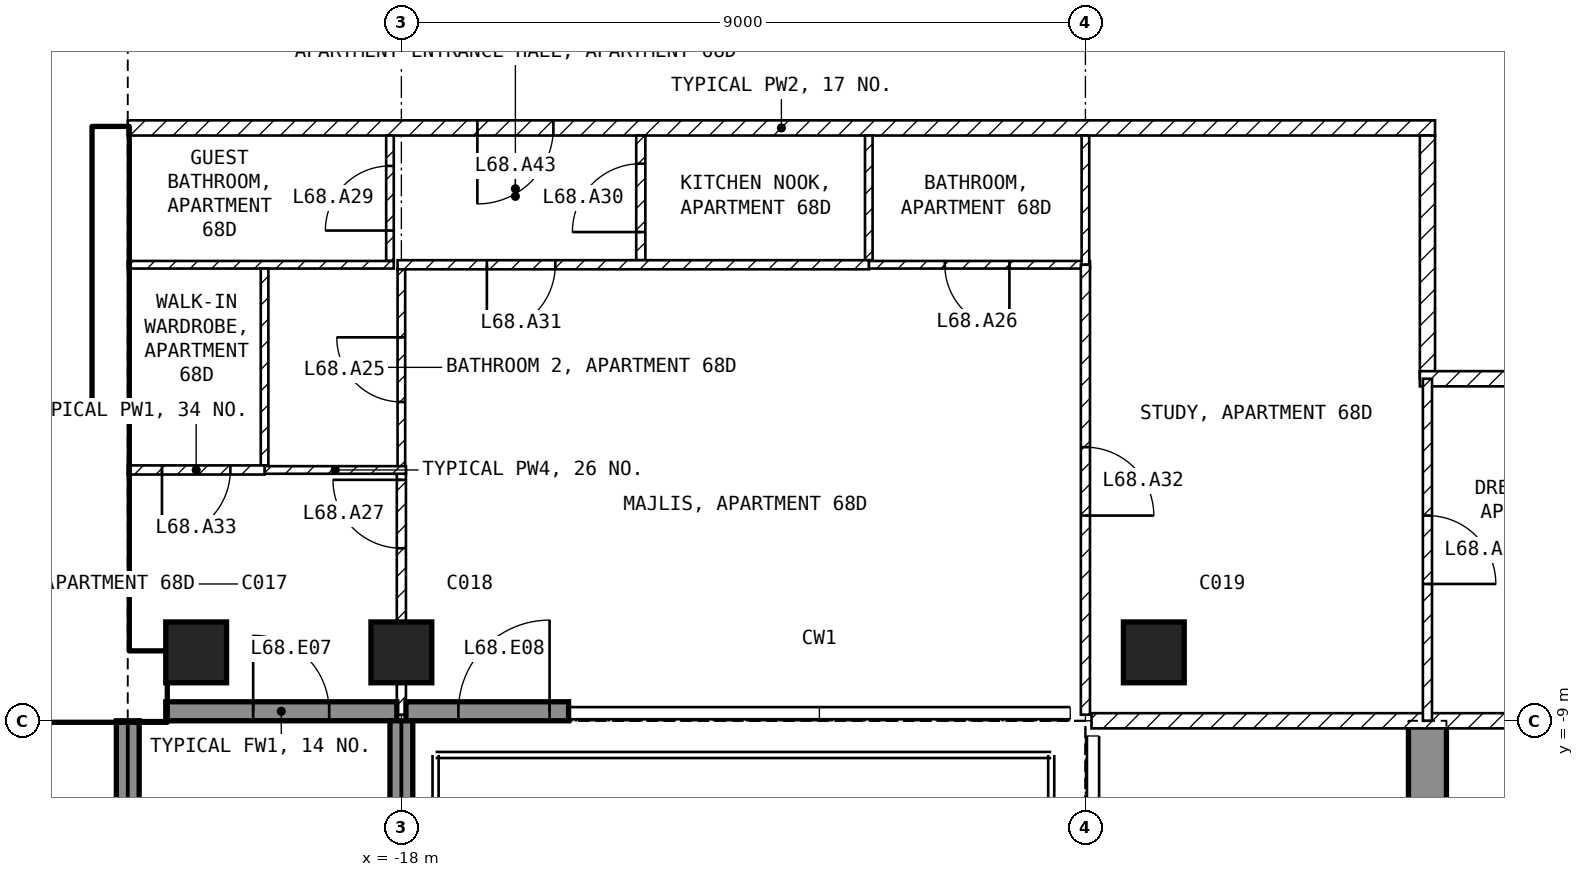
"""IFC4 building model, lengths in metres.
Left out: names, types, materials, properties, quantities, classifications, styles, units other than length and angle.
Written with IfcOpenShell. Run it as: python <this file> out.ifc"""

import sys

from ifc_helpers import new_model, si_unit, direction, frame, frame_2d, origin, origin_2d, place, context, subcontext, project, spatial, polyline, rectangle, outline, extrude, element, fill, save


model = new_model("IFC4")
c1 = context("Model", 3, precision=1e-05, world=origin(), true_north=direction((0.0, 1.0)))
c2 = subcontext(c1, "Body", "Model", "MODEL_VIEW")
j1 = project(units=[si_unit("LENGTHUNIT", "METRE"), si_unit("PLANEANGLEUNIT", "RADIAN")], contexts=[c1])
p1 = place(None, origin())
s1 = spatial("IfcSite", under=j1, at=p1, CompositionType="ELEMENT")
p2 = place(p1, origin())
s2 = spatial("IfcBuilding", under=s1, at=p2, CompositionType="ELEMENT")
p3 = place(p2, frame((0.0, 0.0, 267.5)))
s3 = spatial("IfcBuildingStorey", under=s2, at=p3, CompositionType="ELEMENT", Elevation=267.5)
for number, where, z_axis, x_axis in (
    (1, (-20.7, -8.1, -0.25), (0.0, 0.0, 1.0), (1.0, 0.0, 0.0)),
    (2, (-18.0, -8.1, -0.25), (0.0, 0.0, 1.0), (1.0, 0.0, 0.0)),
    (3, (-8.1, -8.1, -0.25), (0.0, 0.0, 1.0), (1.0, 0.0, 0.0)),
):
    element("IfcColumn", number, at=place(p3, frame(where, z_axis=z_axis, x_axis=x_axis)), inside=s3, PredefinedType="COLUMN", context=c2, shape_type="SweptSolid", body=[
        extrude(rectangle(XDim=0.8, YDim=0.8, at=origin_2d()), origin(), (0.0, 0.0, 1.0), 3.5),
    ])
p4 = place(p3, frame((-4.75, -16.7, -0.25), z_axis=(1.0, 0.0, 0.0), x_axis=(0.0, 1.0, 0.0)))
e4 = element("IfcWall", 4, at=p4, inside=s3, PredefinedType="SHEAR", context=c2, shape_type="SweptSolid", body=[
    extrude(outline(polyline([(0.0, 0.0), (3.2, 0.0), (3.2, 2.65), (5.6, 2.65), (5.6, 0.0), (7.7, 0.0), (7.7, 3.5), (0.0, 3.5), (0.0, 0.0)])), origin(), (0.0, 0.0, 1.0), 0.5),
])
p5 = place(p3, frame((-21.1, -8.875, 0.0), z_axis=(0.0, 0.0, 1.0), x_axis=(1.0, 0.0, 0.0)))
e5 = element("IfcWall", 5, at=p5, inside=s3, PredefinedType="SOLIDWALL", context=c2, shape_type="SweptSolid", body=[
    extrude(rectangle(XDim=3.04, YDim=0.25, at=frame_2d((1.52, 0.0))), origin(), (0.0, 0.0, 1.0), 3.25),
])
p6 = place(p5, frame((1.15, 0.0, 0.0)))
e6 = element("IfcOpeningElement", 6, at=p6, cuts=e5, PredefinedType="OPENING", context=c2, shape_type="SweptSolid", body=[
    extrude(rectangle(XDim=1.0, YDim=2.4, at=frame_2d((0.5, 1.2))), frame((0.0, 0.135, 0.0), z_axis=(0.0, -1.0, 0.0), x_axis=(1.0, 0.0, 0.0)), (0.0, 0.0, 1.0), 0.27),
])
p7 = place(p3, frame((-17.94, -8.875, 0.0), z_axis=(0.0, 0.0, 1.0), x_axis=(1.0, 0.0, 0.0)))
e7 = element("IfcWall", 7, at=p7, inside=s3, PredefinedType="SOLIDWALL", context=c2, shape_type="SweptSolid", body=[
    extrude(rectangle(XDim=2.14, YDim=0.25, at=frame_2d((1.07, 0.0))), origin(), (0.0, 0.0, 1.0), 3.25),
])
p8 = place(p7, frame((0.69, 0.0, 0.0)))
e8 = element("IfcOpeningElement", 8, at=p8, cuts=e7, PredefinedType="OPENING", context=c2, shape_type="SweptSolid", body=[
    extrude(rectangle(XDim=1.2, YDim=2.4, at=frame_2d((0.6, 1.2))), frame((0.0, 0.135, 0.0), z_axis=(0.0, -1.0, 0.0), x_axis=(1.0, 0.0, 0.0)), (0.0, 0.0, 1.0), 0.27),
])
p9 = place(p3, frame((-21.6, -9.0, 0.0), z_axis=(0.0, 0.0, 1.0), x_axis=(0.0, -1.0, 0.0)))
e9 = element("IfcWall", 9, at=p9, inside=s3, PredefinedType="SOLIDWALL", context=c2, shape_type="SweptSolid", body=[
    extrude(rectangle(XDim=2.7, YDim=0.3, at=frame_2d((1.35, 0.0))), origin(), (0.0, 0.0, 1.0), 3.25),
])
p10 = place(p3, frame((-18.0, -9.0, 0.0), z_axis=(0.0, 0.0, 1.0), x_axis=(0.0, -1.0, 0.0)))
e10 = element("IfcWall", 10, at=p10, inside=s3, PredefinedType="SOLIDWALL", context=c2, shape_type="SweptSolid", body=[
    extrude(rectangle(XDim=2.74, YDim=0.3, at=frame_2d((1.37, 0.0))), origin(), (0.0, 0.0, 1.0), 3.25),
])
p11 = place(p3, frame((-30.2, -8.55, 0.0), z_axis=(0.0, 0.0, 1.0), x_axis=(1.0, 0.0, 0.0)))
e11 = element("IfcWall", 11, at=p11, inside=s3, PredefinedType="SHEAR", context=c2, shape_type="SweptSolid", body=[
    extrude(rectangle(XDim=9.1, YDim=0.9, at=frame_2d((4.55, 0.0))), origin(), (0.0, 0.0, 1.0), 3.25),
])
p12 = place(p3, frame((-21.825, -8.1, 0.0), z_axis=(0.0, 0.0, 1.0), x_axis=(0.0, 1.0, 0.0)))
e12 = element("IfcWall", 12, at=p12, inside=s3, PredefinedType="SHEAR", context=c2, shape_type="SweptSolid", body=[
    extrude(rectangle(XDim=6.9, YDim=0.45, at=frame_2d((3.45, 0.0))), origin(), (0.0, 0.0, 1.0), 3.25),
])
p13 = place(p3, frame((-28.35, -5.15, 0.0), z_axis=(0.0, 0.0, 1.0), x_axis=(1.0, 0.0, 0.0)))
e13 = element("IfcWall", 13, at=p13, inside=s3, PredefinedType="SOLIDWALL", context=c2, shape_type="SweptSolid", body=[
    extrude(rectangle(XDim=6.3, YDim=0.2, at=frame_2d((3.15, 0.0))), origin(), (0.0, 0.0, 1.0), 3.25),
])
p14 = place(p13, frame((5.1, 0.0, 0.0)))
e14 = element("IfcOpeningElement", 14, at=p14, cuts=e13, PredefinedType="OPENING", context=c2, shape_type="SweptSolid", body=[
    extrude(rectangle(XDim=1.0, YDim=2.1, at=frame_2d((0.5, 1.05))), frame((0.0, 0.11, 0.0), z_axis=(0.0, -1.0, 0.0), x_axis=(1.0, 0.0, 0.0)), (0.0, 0.0, 1.0), 0.22),
])
p15 = place(p3, frame((-4.4, -1.2, 0.0), z_axis=(0.0, 0.0, 1.0), x_axis=(-1.0, 0.0, 0.0)))
e15 = element("IfcWall", 15, at=p15, inside=s3, PredefinedType="PARTITIONING", context=c2, shape_type="SweptSolid", body=[
    extrude(rectangle(XDim=17.2, YDim=0.2, at=frame_2d((8.6, 0.0))), origin(), (0.0, 0.0, 1.0), 3.25),
])
p16 = place(p15, frame((11.6, 0.0, 0.0)))
e16 = element("IfcOpeningElement", 16, at=p16, cuts=e15, PredefinedType="OPENING", context=c2, shape_type="SweptSolid", body=[
    extrude(rectangle(XDim=1.0, YDim=2.1, at=frame_2d((0.5, 1.05))), frame((0.0, 0.11, 0.0), z_axis=(0.0, -1.0, 0.0), x_axis=(1.0, 0.0, 0.0)), (0.0, 0.0, 1.0), 0.22),
])
p17 = place(p3, frame((-4.5, -4.5, 0.0), z_axis=(0.0, 0.0, 1.0), x_axis=(0.0, 1.0, 0.0)))
e17 = element("IfcWall", 17, at=p17, inside=s3, PredefinedType="PARTITIONING", context=c2, shape_type="SweptSolid", body=[
    extrude(rectangle(XDim=3.2, YDim=0.2, at=frame_2d((1.6, 0.0))), origin(), (0.0, 0.0, 1.0), 3.25),
])
p18 = place(p3, frame((-1.1, -4.5, 0.0), z_axis=(0.0, 0.0, 1.0), x_axis=(-1.0, 0.0, 0.0)))
e18 = element("IfcWall", 18, at=p18, inside=s3, PredefinedType="PARTITIONING", context=c2, shape_type="SweptSolid", body=[
    extrude(rectangle(XDim=3.5, YDim=0.2, at=frame_2d((1.75, 0.0))), origin(), (0.0, 0.0, 1.0), 3.25),
])
p19 = place(p3, frame((8.92, -9.0, 0.0), z_axis=(0.0, 0.0, 1.0), x_axis=(-1.0, 0.0, 0.0)))
e19 = element("IfcWall", 19, at=p19, inside=s3, PredefinedType="PARTITIONING", context=c2, shape_type="SweptSolid", body=[
    extrude(rectangle(XDim=17.84, YDim=0.2, at=frame_2d((8.92, 0.0))), origin(), (0.0, 0.0, 1.0), 3.25),
])
p20 = place(p19, frame((8.42, 0.0, 0.0)))
e20 = element("IfcOpeningElement", 20, at=p20, cuts=e19, PredefinedType="OPENING", context=c2, shape_type="SweptSolid", body=[
    extrude(rectangle(XDim=1.0, YDim=2.1, at=frame_2d((0.5, 1.05))), frame((0.0, 0.11, 0.0), z_axis=(0.0, -1.0, 0.0), x_axis=(1.0, 0.0, 0.0)), (0.0, 0.0, 1.0), 0.22),
])
p21 = place(p3, frame((-11.85, -2.94, 0.0), z_axis=(0.0, 0.0, 1.0), x_axis=(0.0, 1.0, 0.0)))
e21 = element("IfcWall", 21, at=p21, inside=s3, PredefinedType="PARTITIONING", context=c2, shape_type="SweptSolid", body=[
    extrude(rectangle(XDim=1.64, YDim=0.1, at=frame_2d((0.82, 0.0))), origin(), (0.0, 0.0, 1.0), 3.25),
])
p22 = place(p3, frame((-8.94, -3.0, 0.0), z_axis=(0.0, 0.0, 1.0), x_axis=(-1.0, 0.0, 0.0)))
e22 = element("IfcWall", 22, at=p22, inside=s3, PredefinedType="PARTITIONING", context=c2, shape_type="SweptSolid", body=[
    extrude(rectangle(XDim=2.91, YDim=0.1, at=frame_2d((1.455, 0.0))), origin(), (0.0, 0.0, 1.0), 3.25),
])
p23 = place(p22, frame((1.06, 0.0, 0.0)))
e23 = element("IfcOpeningElement", 23, at=p23, cuts=e22, PredefinedType="OPENING", context=c2, shape_type="SweptSolid", body=[
    extrude(rectangle(XDim=0.85, YDim=2.1, at=frame_2d((0.425, 1.05))), frame((0.0, 0.06, 0.0), z_axis=(0.0, -1.0, 0.0), x_axis=(1.0, 0.0, 0.0)), (0.0, 0.0, 1.0), 0.12),
])
p24 = place(p3, frame((-9.0, -1.3, 0.0), z_axis=(0.0, 0.0, 1.0), x_axis=(0.0, -1.0, 0.0)))
e24 = element("IfcWall", 24, at=p24, inside=s3, PredefinedType="PARTITIONING", context=c2, shape_type="SweptSolid", body=[
    extrude(rectangle(XDim=1.7, YDim=0.1, at=frame_2d((0.85, 0.0))), origin(), (0.0, 0.0, 1.0), 3.25),
])
p25 = place(p3, frame((-14.85, -2.94, 0.0), z_axis=(0.0, 0.0, 1.0), x_axis=(0.0, 1.0, 0.0)))
e25 = element("IfcWall", 25, at=p25, inside=s3, PredefinedType="PARTITIONING", context=c2, shape_type="SweptSolid", body=[
    extrude(rectangle(XDim=1.64, YDim=0.12, at=frame_2d((0.82, 0.0))), origin(), (0.0, 0.0, 1.0), 3.25),
])
p26 = place(p25, frame((0.37, 0.0, 0.0)))
e26 = element("IfcOpeningElement", 26, at=p26, cuts=e25, PredefinedType="OPENING", context=c2, shape_type="SweptSolid", body=[
    extrude(rectangle(XDim=0.9, YDim=2.1, at=frame_2d((0.45, 1.05))), frame((0.0, 0.07, 0.0), z_axis=(0.0, -1.0, 0.0), x_axis=(1.0, 0.0, 0.0)), (0.0, 0.0, 1.0), 0.14),
])
p27 = place(p3, frame((-11.85, -3.0, 0.0), z_axis=(0.0, 0.0, 1.0), x_axis=(-1.0, 0.0, 0.0)))
e27 = element("IfcWall", 27, at=p27, inside=s3, PredefinedType="PARTITIONING", context=c2, shape_type="SweptSolid", body=[
    extrude(rectangle(XDim=6.2, YDim=0.12, at=frame_2d((3.1, 0.0))), origin(), (0.0, 0.0, 1.0), 3.25),
])
p28 = place(p27, frame((4.125, 0.0, 0.0)))
e28 = element("IfcOpeningElement", 28, at=p28, cuts=e27, PredefinedType="OPENING", context=c2, shape_type="SweptSolid", body=[
    extrude(rectangle(XDim=0.9, YDim=2.1, at=frame_2d((0.45, 1.05))), frame((0.0, 0.07, 0.0), z_axis=(0.0, -1.0, 0.0), x_axis=(1.0, 0.0, 0.0)), (0.0, 0.0, 1.0), 0.14),
])
p29 = place(p3, frame((-18.15, -2.95, 0.0), z_axis=(0.0, 0.0, 1.0), x_axis=(0.0, 1.0, 0.0)))
e29 = element("IfcWall", 29, at=p29, inside=s3, PredefinedType="PARTITIONING", context=c2, shape_type="SweptSolid", body=[
    extrude(rectangle(XDim=1.65, YDim=0.1, at=frame_2d((0.825, 0.0))), origin(), (0.0, 0.0, 1.0), 2.496),
])
p30 = place(p29, frame((0.4, 0.0, 0.0)))
e30 = element("IfcOpeningElement", 30, at=p30, cuts=e29, PredefinedType="OPENING", context=c2, shape_type="SweptSolid", body=[
    extrude(rectangle(XDim=0.85, YDim=2.1, at=frame_2d((0.425, 1.05))), frame((0.0, 0.06, 0.0), z_axis=(0.0, -1.0, 0.0), x_axis=(1.0, 0.0, 0.0)), (0.0, 0.0, 1.0), 0.12),
])
p31 = place(p3, frame((-18.1, -3.0, 0.0), z_axis=(0.0, 0.0, 1.0), x_axis=(-1.0, 0.0, 0.0)))
e31 = element("IfcWall", 31, at=p31, inside=s3, PredefinedType="PARTITIONING", context=c2, shape_type="SweptSolid", body=[
    extrude(rectangle(XDim=3.5, YDim=0.1, at=frame_2d((1.75, 0.0))), origin(), (0.0, 0.0, 1.0), 3.25),
])
p32 = place(p3, frame((-18.0, -5.7, 0.0), z_axis=(0.0, 0.0, 1.0), x_axis=(0.0, 1.0, 0.0)))
e32 = element("IfcWall", 32, at=p32, inside=s3, PredefinedType="PARTITIONING", context=c2, shape_type="SweptSolid", body=[
    extrude(rectangle(XDim=2.64, YDim=0.1, at=frame_2d((1.32, 0.0))), origin(), (0.0, 0.0, 1.0), 2.496),
])
p33 = place(p32, frame((0.895, 0.0, 0.0)))
e33 = element("IfcOpeningElement", 33, at=p33, cuts=e32, PredefinedType="OPENING", context=c2, shape_type="SweptSolid", body=[
    extrude(rectangle(XDim=0.85, YDim=2.1, at=frame_2d((0.425, 1.05))), frame((0.0, 0.06, 0.0), z_axis=(0.0, -1.0, 0.0), x_axis=(1.0, 0.0, 0.0)), (0.0, 0.0, 1.0), 0.12),
])
p34 = place(p3, frame((-18.0, -8.92, 0.0), z_axis=(0.0, 0.0, 1.0), x_axis=(0.0, 1.0, 0.0)))
e34 = element("IfcWall", 34, at=p34, inside=s3, PredefinedType="PARTITIONING", context=c2, shape_type="SweptSolid", body=[
    extrude(rectangle(XDim=3.22, YDim=0.12, at=frame_2d((1.61, 0.0))), origin(), (0.0, 0.0, 1.0), 2.496),
])
p35 = place(p34, frame((2.19, 0.0, 0.0)))
e35 = element("IfcOpeningElement", 35, at=p35, cuts=e34, PredefinedType="OPENING", context=c2, shape_type="SweptSolid", body=[
    extrude(rectangle(XDim=0.9, YDim=2.1, at=frame_2d((0.45, 1.05))), frame((0.0, 0.07, 0.0), z_axis=(0.0, -1.0, 0.0), x_axis=(1.0, 0.0, 0.0)), (0.0, 0.0, 1.0), 0.14),
])
p36 = place(p3, frame((-9.0, -3.0, 0.0), z_axis=(0.0, 0.0, 1.0), x_axis=(0.0, -1.0, 0.0)))
e36 = element("IfcWall", 36, at=p36, inside=s3, PredefinedType="PARTITIONING", context=c2, shape_type="SweptSolid", body=[
    extrude(rectangle(XDim=5.92, YDim=0.12, at=frame_2d((2.96, 0.0))), origin(), (0.0, 0.0, 1.0), 3.25),
])
p37 = place(p36, frame((2.4, 0.0, 0.0)))
e37 = element("IfcOpeningElement", 37, at=p37, cuts=e36, PredefinedType="OPENING", context=c2, shape_type="SweptSolid", body=[
    extrude(rectangle(XDim=0.9, YDim=2.1, at=frame_2d((0.45, 1.05))), frame((0.0, 0.07, 0.0), z_axis=(0.0, -1.0, 0.0), x_axis=(1.0, 0.0, 0.0)), (0.0, 0.0, 1.0), 0.14),
])
p38 = place(p3, frame((-19.8, -5.64, 0.0), z_axis=(0.0, 0.0, 1.0), x_axis=(0.0, 1.0, 0.0)))
e38 = element("IfcWall", 38, at=p38, inside=s3, PredefinedType="PARTITIONING", context=c2, shape_type="SweptSolid", body=[
    extrude(rectangle(XDim=2.59, YDim=0.1, at=frame_2d((1.295, 0.0))), origin(), (0.0, 0.0, 1.0), 3.25),
])
p39 = place(p3, frame((-17.94, -5.7, 0.0), z_axis=(0.0, 0.0, 1.0), x_axis=(-1.0, 0.0, 0.0)))
e39 = element("IfcWall", 39, at=p39, inside=s3, PredefinedType="PARTITIONING", context=c2, shape_type="SweptSolid", body=[
    extrude(rectangle(XDim=1.86, YDim=0.1, at=frame_2d((0.93, 0.0))), origin(), (0.0, 0.0, 1.0), 3.25),
])
p40 = place(p3, frame((-19.8, -5.7, 0.0), z_axis=(0.0, 0.0, 1.0), x_axis=(-1.0, 0.0, 0.0)))
e40 = element("IfcWall", 40, at=p40, inside=s3, PredefinedType="PARTITIONING", context=c2, shape_type="SweptSolid", body=[
    extrude(rectangle(XDim=1.8, YDim=0.12, at=frame_2d((0.9, 0.0))), origin(), (0.0, 0.0, 1.0), 3.25),
])
p41 = place(p40, frame((0.45, 0.0, 0.0)))
e41 = element("IfcOpeningElement", 41, at=p41, cuts=e40, PredefinedType="OPENING", context=c2, shape_type="SweptSolid", body=[
    extrude(rectangle(XDim=0.9, YDim=2.1, at=frame_2d((0.45, 1.05))), frame((0.0, 0.07, 0.0), z_axis=(0.0, -1.0, 0.0), x_axis=(1.0, 0.0, 0.0)), (0.0, 0.0, 1.0), 0.14),
])
p42 = place(p3, frame((-4.5, -4.5, 0.0), z_axis=(0.0, 0.0, 1.0), x_axis=(0.0, -1.0, 0.0)))
e42 = element("IfcWall", 42, at=p42, inside=s3, PredefinedType="PARTITIONING", context=c2, shape_type="SweptSolid", body=[
    extrude(rectangle(XDim=4.5, YDim=0.12, at=frame_2d((2.25, 0.0))), origin(), (0.0, 0.0, 1.0), 3.25),
])
p43 = place(p42, frame((1.8, 0.0, 0.0)))
e43 = element("IfcOpeningElement", 43, at=p43, cuts=e42, PredefinedType="OPENING", context=c2, shape_type="SweptSolid", body=[
    extrude(rectangle(XDim=0.9, YDim=2.1, at=frame_2d((0.45, 1.05))), frame((0.0, 0.07, 0.0), z_axis=(0.0, -1.0, 0.0), x_axis=(1.0, 0.0, 0.0)), (0.0, 0.0, 1.0), 0.14),
])
p44 = place(p6, origin())
e44 = element("IfcDoor", 44, at=p44, inside=s3, OperationType="SINGLE_SWING_LEFT", PredefinedType="DOOR", context=c2, shape_type="SweptSolid", body=[
    extrude(rectangle(XDim=1.0, YDim=2.4, at=frame_2d((0.5, 1.2))), frame((0.0, 0.025, 0.0), z_axis=(0.0, -1.0, 0.0), x_axis=(1.0, 0.0, 0.0)), (0.0, 0.0, 1.0), 0.05),
])
fill(e6, e44)
p45 = place(p8, origin())
e45 = element("IfcDoor", 45, at=p45, inside=s3, OperationType="SINGLE_SWING_RIGHT", PredefinedType="DOOR", context=c2, shape_type="SweptSolid", body=[
    extrude(rectangle(XDim=1.2, YDim=2.4, at=frame_2d((0.6, 1.2))), frame((0.0, 0.025, 0.0), z_axis=(0.0, -1.0, 0.0), x_axis=(1.0, 0.0, 0.0)), (0.0, 0.0, 1.0), 0.05),
])
fill(e8, e45)
p46 = place(p14, origin())
e46 = element("IfcDoor", 46, at=p46, inside=s3, OperationType="SINGLE_SWING_LEFT", PredefinedType="DOOR", context=c2, shape_type="SweptSolid", body=[
    extrude(rectangle(XDim=1.0, YDim=2.1, at=frame_2d((0.5, 1.05))), frame((0.0, 0.025, 0.0), z_axis=(0.0, -1.0, 0.0), x_axis=(1.0, 0.0, 0.0)), (0.0, 0.0, 1.0), 0.05),
])
fill(e14, e46)
p47 = place(p33, origin())
e47 = element("IfcDoor", 47, at=p47, inside=s3, OperationType="SINGLE_SWING_RIGHT", PredefinedType="DOOR", context=c2, shape_type="SweptSolid", body=[
    extrude(rectangle(XDim=0.85, YDim=2.1, at=frame_2d((0.425, 1.05))), frame((0.0, 0.025, 0.0), z_axis=(0.0, -1.0, 0.0), x_axis=(1.0, 0.0, 0.0)), (0.0, 0.0, 1.0), 0.05),
])
fill(e33, e47)
p48 = place(p23, origin())
e48 = element("IfcDoor", 48, at=p48, inside=s3, OperationType="SINGLE_SWING_LEFT", PredefinedType="DOOR", context=c2, shape_type="SweptSolid", body=[
    extrude(rectangle(XDim=0.85, YDim=2.1, at=frame_2d((0.425, 1.05))), frame((0.0, 0.025, 0.0), z_axis=(0.0, -1.0, 0.0), x_axis=(1.0, 0.0, 0.0)), (0.0, 0.0, 1.0), 0.05),
])
fill(e23, e48)
p49 = place(p35, origin())
e49 = element("IfcDoor", 49, at=p49, inside=s3, OperationType="SINGLE_SWING_RIGHT", PredefinedType="DOOR", context=c2, shape_type="SweptSolid", body=[
    extrude(rectangle(XDim=0.9, YDim=2.1, at=frame_2d((0.45, 1.05))), frame((0.0, 0.025, 0.0), z_axis=(0.0, -1.0, 0.0), x_axis=(1.0, 0.0, 0.0)), (0.0, 0.0, 1.0), 0.05),
])
fill(e35, e49)
p50 = place(p43, origin())
e50 = element("IfcDoor", 50, at=p50, inside=s3, OperationType="SINGLE_SWING_RIGHT", PredefinedType="DOOR", context=c2, shape_type="SweptSolid", body=[
    extrude(rectangle(XDim=0.9, YDim=2.1, at=frame_2d((0.45, 1.05))), frame((0.0, 0.025, 0.0), z_axis=(0.0, -1.0, 0.0), x_axis=(1.0, 0.0, 0.0)), (0.0, 0.0, 1.0), 0.05),
])
fill(e43, e50)
p51 = place(p30, origin())
e51 = element("IfcDoor", 51, at=p51, inside=s3, OperationType="SINGLE_SWING_LEFT", PredefinedType="DOOR", context=c2, shape_type="SweptSolid", body=[
    extrude(rectangle(XDim=0.85, YDim=2.1, at=frame_2d((0.425, 1.05))), frame((0.0, 0.025, 0.0), z_axis=(0.0, -1.0, 0.0), x_axis=(1.0, 0.0, 0.0)), (0.0, 0.0, 1.0), 0.05),
])
fill(e30, e51)
p52 = place(p26, origin())
e52 = element("IfcDoor", 52, at=p52, inside=s3, OperationType="SINGLE_SWING_LEFT", PredefinedType="DOOR", context=c2, shape_type="SweptSolid", body=[
    extrude(rectangle(XDim=0.9, YDim=2.1, at=frame_2d((0.45, 1.05))), frame((0.0, 0.025, 0.0), z_axis=(0.0, -1.0, 0.0), x_axis=(1.0, 0.0, 0.0)), (0.0, 0.0, 1.0), 0.05),
])
fill(e26, e52)
p53 = place(p28, origin())
e53 = element("IfcDoor", 53, at=p53, inside=s3, OperationType="SINGLE_SWING_RIGHT", PredefinedType="DOOR", context=c2, shape_type="SweptSolid", body=[
    extrude(rectangle(XDim=0.9, YDim=2.1, at=frame_2d((0.45, 1.05))), frame((0.0, 0.025, 0.0), z_axis=(0.0, -1.0, 0.0), x_axis=(1.0, 0.0, 0.0)), (0.0, 0.0, 1.0), 0.05),
])
fill(e28, e53)
p54 = place(p37, origin())
e54 = element("IfcDoor", 54, at=p54, inside=s3, OperationType="SINGLE_SWING_RIGHT", PredefinedType="DOOR", context=c2, shape_type="SweptSolid", body=[
    extrude(rectangle(XDim=0.9, YDim=2.1, at=frame_2d((0.45, 1.05))), frame((0.0, 0.025, 0.0), z_axis=(0.0, -1.0, 0.0), x_axis=(1.0, 0.0, 0.0)), (0.0, 0.0, 1.0), 0.05),
])
fill(e37, e54)
p55 = place(p41, origin())
e55 = element("IfcDoor", 55, at=p55, inside=s3, OperationType="SINGLE_SWING_RIGHT", PredefinedType="DOOR", context=c2, shape_type="SweptSolid", body=[
    extrude(rectangle(XDim=0.9, YDim=2.1, at=frame_2d((0.45, 1.05))), frame((0.0, 0.025, 0.0), z_axis=(0.0, -1.0, 0.0), x_axis=(1.0, 0.0, 0.0)), (0.0, 0.0, 1.0), 0.05),
])
fill(e41, e55)
p56 = place(p16, origin())
e56 = element("IfcDoor", 56, at=p56, inside=s3, OperationType="SINGLE_SWING_RIGHT", PredefinedType="DOOR", context=c2, shape_type="SweptSolid", body=[
    extrude(rectangle(XDim=1.0, YDim=2.1, at=frame_2d((0.5, 1.05))), frame((0.0, 0.025, 0.0), z_axis=(0.0, -1.0, 0.0), x_axis=(1.0, 0.0, 0.0)), (0.0, 0.0, 1.0), 0.05),
])
fill(e16, e56)
save(model, sys.argv[1])
